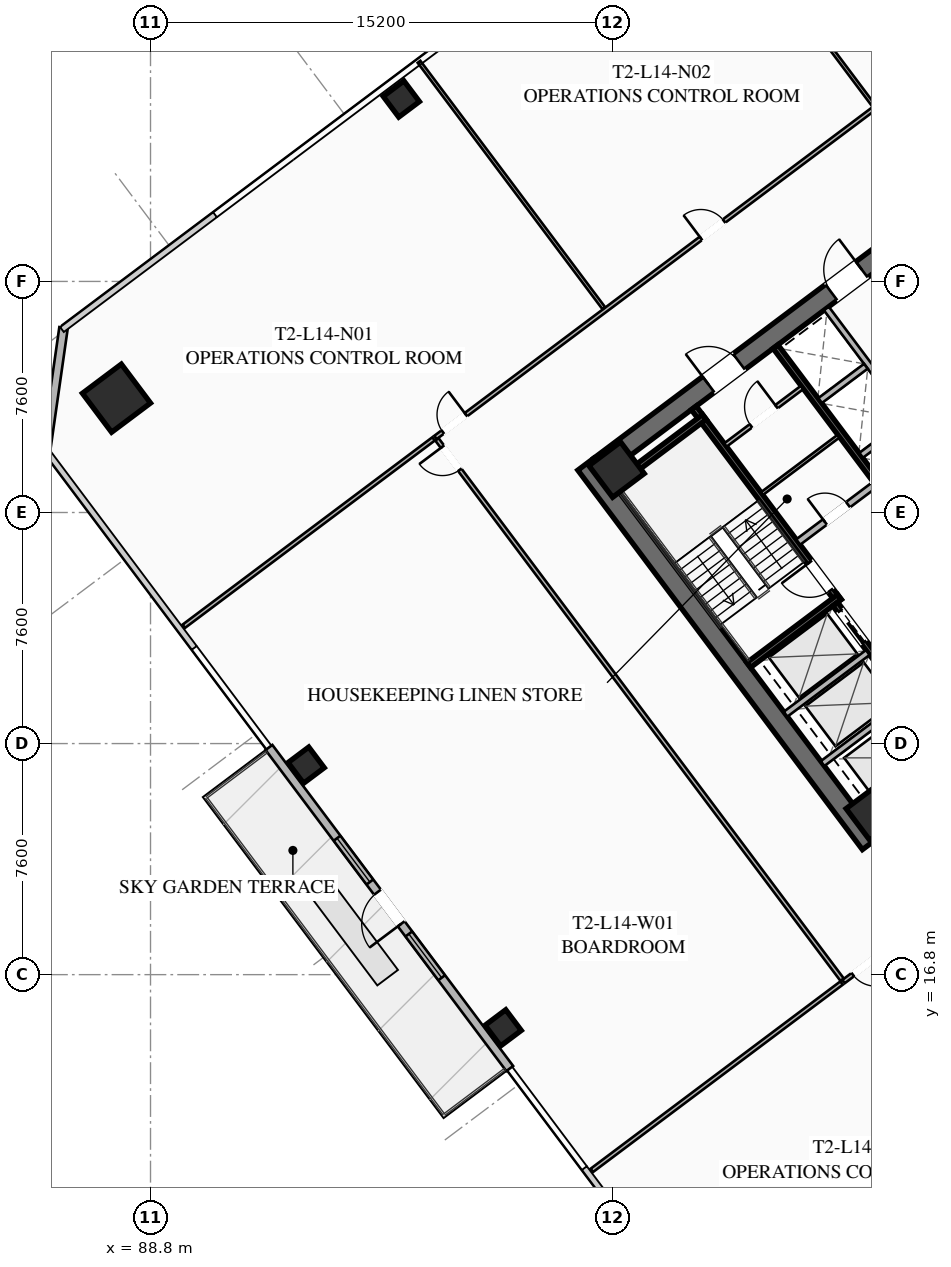
"""IFC4 building model, lengths in metres.
Left out: names, types, materials, properties, quantities, classifications, styles, units other than length and angle.
Written with IfcOpenShell. Run it as: python <this file> out.ifc"""

import sys

from ifc_helpers import new_model, si_unit, direction, frame, frame_2d, origin, origin_2d, place, context, subcontext, project, spatial, rectangle, hollow_rectangle, extrude, element, fill, save


model = new_model("IFC4")
c1 = context("Model", 3, precision=1e-05, world=origin(), true_north=direction((0.0, 1.0)))
c2 = subcontext(c1, "Body", "Model", "MODEL_VIEW")
j1 = project(units=[si_unit("LENGTHUNIT", "METRE"), si_unit("PLANEANGLEUNIT", "RADIAN")], contexts=[c1])
p1 = place(None, origin())
s1 = spatial("IfcSite", under=j1, at=p1, CompositionType="ELEMENT")
p2 = place(p1, origin())
s2 = spatial("IfcBuilding", under=s1, at=p2, CompositionType="ELEMENT")
p3 = place(p2, frame((0.0, 0.0, 56.55)))
s3 = spatial("IfcBuildingStorey", under=s2, at=p3, CompositionType="ELEMENT", Elevation=56.55)
p4 = place(p3, frame((112.476, 21.107, 0.0), z_axis=(0.0, 0.0, 1.0), x_axis=(-0.600005007985, 0.799996243986, 0.0)))
e1 = element("IfcWall", 1, at=p4, inside=s3, PredefinedType="SHEAR", context=c2, shape_type="SweptSolid", body=[
    extrude(rectangle(XDim=15.6, YDim=0.65, at=frame_2d((7.8, 0.0))), origin(), (0.0, 0.0, 1.0), 3.55),
])
p5 = place(p3, frame((124.429, 30.478, 0.0), z_axis=(0.0, 0.0, 1.0), x_axis=(-0.799998028465, -0.600002628705, 0.0)))
e2 = element("IfcWall", 2, at=p5, inside=s3, PredefinedType="SHEAR", context=c2, shape_type="SweptSolid", body=[
    extrude(rectangle(XDim=14.86, YDim=0.65, at=frame_2d((7.43, 0.0))), origin(), (0.0, 0.0, 1.0), 3.55),
])
p6 = place(p5, frame((9.13, 0.0, 0.0)))
e3 = element("IfcOpeningElement", 3, at=p6, cuts=e2, PredefinedType="OPENING", context=c2, shape_type="SweptSolid", body=[
    extrude(rectangle(XDim=1.25, YDim=2.25, at=frame_2d((0.625, 1.125))), frame((0.0, 0.335, 0.0), z_axis=(0.0, -1.0, 0.0), x_axis=(1.0, 0.0, 0.0)), (0.0, 0.0, 1.0), 0.67),
])
p7 = place(p5, frame((4.08, 0.0, 0.0)))
e4 = element("IfcOpeningElement", 4, at=p7, cuts=e2, PredefinedType="OPENING", context=c2, shape_type="SweptSolid", body=[
    extrude(rectangle(XDim=1.25, YDim=2.25, at=frame_2d((0.625, 1.125))), frame((0.0, 0.335, 0.0), z_axis=(0.0, -1.0, 0.0), x_axis=(1.0, 0.0, 0.0)), (0.0, 0.0, 1.0), 0.67),
])
p8 = place(p3, frame((103.571, 33.522, 0.0), z_axis=(0.0, 0.0, 1.0), x_axis=(0.799998028465, 0.600002628705, 0.0)))
e5 = element("IfcWall", 5, at=p8, inside=s3, PredefinedType="SHEAR", context=c2, shape_type="SweptSolid", body=[
    extrude(rectangle(XDim=14.86, YDim=0.65, at=frame_2d((7.43, 0.0))), origin(), (0.0, 0.0, 1.0), 3.55),
])
p9 = place(p8, frame((4.48, 0.0, 0.0)))
e6 = element("IfcOpeningElement", 6, at=p9, cuts=e5, PredefinedType="OPENING", context=c2, shape_type="SweptSolid", body=[
    extrude(rectangle(XDim=1.25, YDim=2.25, at=frame_2d((0.625, 1.125))), frame((0.0, 0.335, 0.0), z_axis=(0.0, -1.0, 0.0), x_axis=(1.0, 0.0, 0.0)), (0.0, 0.0, 1.0), 0.67),
])
p10 = place(p8, frame((9.53, 0.0, 0.0)))
e7 = element("IfcOpeningElement", 7, at=p10, cuts=e5, PredefinedType="OPENING", context=c2, shape_type="SweptSolid", body=[
    extrude(rectangle(XDim=1.25, YDim=2.25, at=frame_2d((0.625, 1.125))), frame((0.0, 0.335, 0.0), z_axis=(0.0, -1.0, 0.0), x_axis=(1.0, 0.0, 0.0)), (0.0, 0.0, 1.0), 0.67),
])
for number, where, z_axis, x_axis in (
    (8, (112.59, 22.13, 0.0), (0.0, 0.0, 1.0), (0.8, 0.6, 0.0)),
    (9, (104.13, 33.41, 0.0), (0.0, 0.0, 1.0), (0.8, 0.6, 0.0)),
):
    element("IfcColumn", number, at=place(p3, frame(where, z_axis=z_axis, x_axis=x_axis)), inside=s3, PredefinedType="COLUMN", context=c2, shape_type="SweptSolid", body=[
        extrude(hollow_rectangle(XDim=1.3, YDim=1.3, WallThickness=0.05, at=origin_2d()), origin(), (0.0, 0.0, 1.0), 3.35),
    ])
p11 = place(p3, frame((87.68, 35.76, 0.0), z_axis=(0.0, 0.0, 1.0), x_axis=(0.799999996291, 0.600000004945, 0.0)))
e10 = element("IfcColumn", 10, at=p11, inside=s3, PredefinedType="COLUMN", context=c2, shape_type="SweptSolid", body=[
    extrude(hollow_rectangle(XDim=1.6, YDim=1.6, WallThickness=0.06, at=origin_2d()), origin(), (0.0, 0.0, 1.0), 3.35),
])
for number, where, z_axis, x_axis in (
    (11, (97.05, 45.6, 0.0), (0.0, 0.0, 1.0), (0.8, 0.6, 0.0)),
    (12, (93.92, 23.69, 0.0), (0.0, 0.0, 1.0), (0.8, 0.6, 0.0)),
    (13, (100.4, 15.05, 0.0), (0.0, 0.0, 1.0), (0.8, 0.6, 0.0)),
):
    element("IfcColumn", number, at=place(p3, frame(where, z_axis=z_axis, x_axis=x_axis)), inside=s3, PredefinedType="COLUMN", context=c2, shape_type="SweptSolid", body=[
        extrude(hollow_rectangle(XDim=0.85, YDim=0.85, WallThickness=0.035, at=origin_2d()), origin(), (0.0, 0.0, 1.0), 3.35),
    ])
p12 = place(p3, frame((100.616, 13.712, 0.0), z_axis=(0.0, 0.0, 1.0), x_axis=(-0.599994081423, 0.800004438899, 0.0)))
e14 = element("IfcWall", 14, at=p12, inside=s3, PredefinedType="SOLIDWALL", context=c2, shape_type="SweptSolid", body=[
    extrude(rectangle(XDim=13.2, YDim=0.28, at=frame_2d((6.6, 0.0))), origin(), (0.0, 0.0, 1.0), 3.35),
])
p13 = place(p12, frame((5.95, 0.0, 0.0)))
e15 = element("IfcOpeningElement", 15, at=p13, cuts=e14, PredefinedType="OPENING", context=c2, shape_type="SweptSolid", body=[
    extrude(rectangle(XDim=1.3, YDim=2.15, at=frame_2d((0.65, 1.075))), frame((0.0, 0.15, 0.0), z_axis=(0.0, -1.0, 0.0), x_axis=(1.0, 0.0, 0.0)), (0.0, 0.0, 1.0), 0.3),
])
p14 = place(p12, frame((3.732, 0.0, 0.85)))
e16 = element("IfcOpeningElement", 16, at=p14, cuts=e14, PredefinedType="OPENING", context=c2, shape_type="SweptSolid", body=[
    extrude(rectangle(XDim=1.8, YDim=1.92, at=frame_2d((0.9, 0.96))), frame((0.0, 0.15, 0.0), z_axis=(0.0, -1.0, 0.0), x_axis=(1.0, 0.0, 0.0)), (0.0, 0.0, 1.0), 0.3),
])
p15 = place(p12, frame((7.668, 0.0, 0.85)))
e17 = element("IfcOpeningElement", 17, at=p15, cuts=e14, PredefinedType="OPENING", context=c2, shape_type="SweptSolid", body=[
    extrude(rectangle(XDim=1.8, YDim=1.92, at=frame_2d((0.9, 0.96))), frame((0.0, 0.15, 0.0), z_axis=(0.0, -1.0, 0.0), x_axis=(1.0, 0.0, 0.0)), (0.0, 0.0, 1.0), 0.3),
])
p16 = place(p3, frame((85.36, 34.02, 0.0), z_axis=(0.0, 0.0, 1.0), x_axis=(0.14137968631, 0.989955445613, 0.0)))
e18 = element("IfcWall", 18, at=p16, inside=s3, PredefinedType="SOLIDWALL", context=c2, shape_type="SweptSolid", body=[
    extrude(rectangle(XDim=4.101, YDim=0.28, at=frame_2d((2.051, 0.0))), origin(), (0.0, 0.0, 1.0), 3.35),
])
p17 = place(p3, frame((111.44, 29.08, 0.0), z_axis=(0.0, 0.0, 1.0), x_axis=(-0.600009827119, 0.799992629566, 0.0)))
e19 = element("IfcWall", 19, at=p17, inside=s3, PredefinedType="SHEAR", context=c2, shape_type="SweptSolid", body=[
    extrude(rectangle(XDim=7.95, YDim=0.2, at=frame_2d((3.975, 0.0))), origin(), (0.0, 0.0, 1.0), 3.35),
])
p18 = place(p17, frame((0.45, 0.0, 0.0)))
e20 = element("IfcOpeningElement", 20, at=p18, cuts=e19, PredefinedType="OPENING", context=c2, shape_type="SweptSolid", body=[
    extrude(rectangle(XDim=1.15, YDim=2.2, at=frame_2d((0.575, 1.1))), frame((0.0, 0.11, 0.0), z_axis=(0.0, -1.0, 0.0), x_axis=(1.0, 0.0, 0.0)), (0.0, 0.0, 1.0), 0.22),
])
for number, where, z_axis, x_axis in (
    (21, (108.476, 26.982, 0.0), (0.0, 0.0, 1.0), (0.8, 0.6, 0.0)),
    (22, (104.036, 32.902, 0.0), (0.0, 0.0, 1.0), (0.8, 0.6, 0.0)),
):
    element("IfcWall", number, at=place(p3, frame(where, z_axis=z_axis, x_axis=x_axis)), inside=s3, PredefinedType="SHEAR", context=c2, shape_type="SweptSolid", body=[
        extrude(rectangle(XDim=3.73, YDim=0.2, at=frame_2d((1.865, 0.0))), origin(), (0.0, 0.0, 1.0), 3.35),
    ])
p19 = place(p3, frame((117.938, 26.016, 0.0), z_axis=(0.0, 0.0, 1.0), x_axis=(-0.600005463273, 0.799995902516, 0.0)))
e23 = element("IfcWall", 23, at=p19, inside=s3, PredefinedType="SHEAR", context=c2, shape_type="SweptSolid", body=[
    extrude(rectangle(XDim=14.3, YDim=0.2, at=frame_2d((7.15, 0.0))), origin(), (0.0, 0.0, 1.0), 3.35),
])
p20 = place(p3, frame((110.104, 31.028, 0.0), z_axis=(0.0, 0.0, 1.0), x_axis=(0.800018601094, 0.59997519774, 0.0)))
e24 = element("IfcWall", 24, at=p20, inside=s3, PredefinedType="SOLIDWALL", context=c2, shape_type="SweptSolid", body=[
    extrude(rectangle(XDim=3.15, YDim=0.22, at=frame_2d((1.575, 0.0))), origin(), (0.0, 0.0, 1.0), 2.703),
])
p21 = place(p20, frame((1.1, 0.0, 0.0)))
e25 = element("IfcOpeningElement", 25, at=p21, cuts=e24, PredefinedType="OPENING", context=c2, shape_type="SweptSolid", body=[
    extrude(rectangle(XDim=0.95, YDim=2.05, at=frame_2d((0.475, 1.025))), frame((0.0, 0.12, 0.0), z_axis=(0.0, -1.0, 0.0), x_axis=(1.0, 0.0, 0.0)), (0.0, 0.0, 1.0), 0.24),
])
p22 = place(p3, frame((115.13, 23.91, 0.0), z_axis=(0.0, 0.0, 1.0), x_axis=(-0.599975393228, 0.800018454488, 0.0)))
e26 = element("IfcWall", 26, at=p22, inside=s3, PredefinedType="SHEAR", context=c2, shape_type="SweptSolid", body=[
    extrude(rectangle(XDim=6.35, YDim=0.2, at=frame_2d((3.175, 0.0))), origin(), (0.0, 0.0, 1.0), 3.35),
])
p23 = place(p22, frame((4.775, 0.0, 0.0)))
e27 = element("IfcOpeningElement", 27, at=p23, cuts=e26, PredefinedType="OPENING", context=c2, shape_type="SweptSolid", body=[
    extrude(rectangle(XDim=1.3, YDim=2.25, at=frame_2d((0.65, 1.125))), frame((0.0, 0.11, 0.0), z_axis=(0.0, -1.0, 0.0), x_axis=(1.0, 0.0, 0.0)), (0.0, 0.0, 1.0), 0.22),
])
p24 = place(p22, frame((2.775, 0.0, 0.0)))
e28 = element("IfcOpeningElement", 28, at=p24, cuts=e26, PredefinedType="OPENING", context=c2, shape_type="SweptSolid", body=[
    extrude(rectangle(XDim=1.3, YDim=2.25, at=frame_2d((0.65, 1.125))), frame((0.0, 0.11, 0.0), z_axis=(0.0, -1.0, 0.0), x_axis=(1.0, 0.0, 0.0)), (0.0, 0.0, 1.0), 0.22),
])
p25 = place(p22, frame((0.575, 0.0, 0.0)))
e29 = element("IfcOpeningElement", 29, at=p25, cuts=e26, PredefinedType="OPENING", context=c2, shape_type="SweptSolid", body=[
    extrude(rectangle(XDim=1.3, YDim=2.25, at=frame_2d((0.65, 1.125))), frame((0.0, 0.11, 0.0), z_axis=(0.0, -1.0, 0.0), x_axis=(1.0, 0.0, 0.0)), (0.0, 0.0, 1.0), 0.22),
])
for number, where, z_axis, x_axis in (
    (30, (110.906, 23.742, 0.0), (0.0, 0.0, 1.0), (0.8, 0.6, 0.0)),
    (31, (109.688, 25.366, 0.0), (0.0, 0.0, 1.0), (0.8, 0.6, 0.0)),
):
    element("IfcWall", number, at=place(p3, frame(where, z_axis=z_axis, x_axis=x_axis)), inside=s3, PredefinedType="SOLIDWALL", context=c2, shape_type="SweptSolid", body=[
        extrude(rectangle(XDim=3.38, YDim=0.2, at=frame_2d((1.69, 0.0))), origin(), (0.0, 0.0, 1.0), 3.35),
    ])
p26 = place(p3, frame((107.71, 34.22, 0.0), z_axis=(0.0, 0.0, 1.0), x_axis=(0.799981399002, 0.60002480053, 0.0)))
e32 = element("IfcWall", 32, at=p26, inside=s3, PredefinedType="PARTITIONING", context=c2, shape_type="SweptSolid", body=[
    extrude(rectangle(XDim=3.15, YDim=0.135, at=frame_2d((1.575, 0.0))), origin(), (0.0, 0.0, 1.0), 2.703),
])
p27 = place(p26, frame((1.05, 0.0, 0.0)))
e33 = element("IfcOpeningElement", 33, at=p27, cuts=e32, PredefinedType="OPENING", context=c2, shape_type="SweptSolid", body=[
    extrude(rectangle(XDim=1.05, YDim=2.2, at=frame_2d((0.525, 1.1))), frame((0.0, 0.077, 0.0), z_axis=(0.0, -1.0, 0.0), x_axis=(1.0, 0.0, 0.0)), (0.0, 0.0, 1.0), 0.155),
])
p28 = place(p3, frame((108.91, 32.62, 0.0), z_axis=(0.0, 0.0, 1.0), x_axis=(0.800018601094, 0.59997519774, 0.0)))
e34 = element("IfcWall", 34, at=p28, inside=s3, PredefinedType="PARTITIONING", context=c2, shape_type="SweptSolid", body=[
    extrude(rectangle(XDim=3.15, YDim=0.11, at=frame_2d((1.575, 0.0))), origin(), (0.0, 0.0, 1.0), 2.703),
])
p29 = place(p3, frame((115.11, 33.27, 0.0), z_axis=(0.0, 0.0, 1.0), x_axis=(-0.600011488909, 0.79999138319, 0.0)))
e35 = element("IfcWall", 35, at=p29, inside=s3, PredefinedType="SOLIDWALL", context=c2, shape_type="SweptSolid", body=[
    extrude(rectangle(XDim=6.8, YDim=0.2, at=frame_2d((3.4, 0.0))), origin(), (0.0, 0.0, 1.0), 3.35),
])
p30 = place(p3, frame((112.176, 33.882, 0.0), z_axis=(0.0, 0.0, 1.0), x_axis=(0.8, 0.6, 0.0)))
e36 = element("IfcWall", 36, at=p30, inside=s3, PredefinedType="SOLIDWALL", context=c2, shape_type="SweptSolid", body=[
    extrude(rectangle(XDim=1.88, YDim=0.2, at=frame_2d((0.94, 0.0))), origin(), (0.0, 0.0, 1.0), 3.35),
])
p31 = place(p3, frame((110.826, 35.682, 0.0), z_axis=(0.0, 0.0, 1.0), x_axis=(0.799984418148, 0.600020775241, 0.0)))
e37 = element("IfcWall", 37, at=p31, inside=s3, PredefinedType="SOLIDWALL", context=c2, shape_type="SweptSolid", body=[
    extrude(rectangle(XDim=1.88, YDim=0.2, at=frame_2d((0.94, 0.0))), origin(), (0.0, 0.0, 1.0), 3.35),
])
p32 = place(p3, frame((98.174, 34.468, 0.0), z_axis=(0.0, 0.0, 1.0), x_axis=(0.800000982127, 0.599998690494, 0.0)))
e38 = element("IfcWall", 38, at=p32, inside=s3, PredefinedType="PARTITIONING", context=c2, shape_type="SweptSolid", body=[
    extrude(rectangle(XDim=29.83, YDim=0.135, at=frame_2d((14.915, 0.0))), origin(), (0.0, 0.0, 1.0), 2.703),
])
p33 = place(p32, frame((0.3, 0.0, 0.0)))
e39 = element("IfcOpeningElement", 39, at=p33, cuts=e38, PredefinedType="OPENING", context=c2, shape_type="SweptSolid", body=[
    extrude(rectangle(XDim=0.95, YDim=2.05, at=frame_2d((0.475, 1.025))), frame((0.0, 0.077, 0.0), z_axis=(0.0, -1.0, 0.0), x_axis=(1.0, 0.0, 0.0)), (0.0, 0.0, 1.0), 0.155),
])
p34 = place(p32, frame((10.913, 0.0, 0.0)))
e40 = element("IfcOpeningElement", 40, at=p34, cuts=e38, PredefinedType="OPENING", context=c2, shape_type="SweptSolid", body=[
    extrude(rectangle(XDim=0.95, YDim=2.05, at=frame_2d((0.475, 1.025))), frame((0.0, 0.077, 0.0), z_axis=(0.0, -1.0, 0.0), x_axis=(1.0, 0.0, 0.0)), (0.0, 0.0, 1.0), 0.155),
])
p35 = place(p32, frame((28.58, 0.0, 0.0)))
e41 = element("IfcOpeningElement", 41, at=p35, cuts=e38, PredefinedType="OPENING", context=c2, shape_type="SweptSolid", body=[
    extrude(rectangle(XDim=0.95, YDim=2.05, at=frame_2d((0.475, 1.025))), frame((0.0, 0.077, 0.0), z_axis=(0.0, -1.0, 0.0), x_axis=(1.0, 0.0, 0.0)), (0.0, 0.0, 1.0), 0.155),
])
p36 = place(p3, frame((103.71, 38.72, 0.0), z_axis=(0.0, 0.0, 1.0), x_axis=(-0.599992287679, 0.800005784183, 0.0)))
e42 = element("IfcWall", 42, at=p36, inside=s3, PredefinedType="PARTITIONING", context=c2, shape_type="SweptSolid", body=[
    extrude(rectangle(XDim=10.13, YDim=0.11, at=frame_2d((5.065, 0.0))), origin(), (0.0, 0.0, 1.0), 2.703),
])
p37 = place(p3, frame((112.59, 45.38, 0.0), z_axis=(0.0, 0.0, 1.0), x_axis=(-0.600007712154, 0.799994215827, 0.0)))
e43 = element("IfcWall", 43, at=p37, inside=s3, PredefinedType="PARTITIONING", context=c2, shape_type="SweptSolid", body=[
    extrude(rectangle(XDim=10.13, YDim=0.11, at=frame_2d((5.065, 0.0))), origin(), (0.0, 0.0, 1.0), 2.703),
])
p38 = place(p3, frame((135.46, 34.47, 0.0), z_axis=(0.0, 0.0, 1.0), x_axis=(-0.800000982127, -0.599998690494, 0.0)))
e44 = element("IfcWall", 44, at=p38, inside=s3, PredefinedType="PARTITIONING", context=c2, shape_type="SweptSolid", body=[
    extrude(rectangle(XDim=29.83, YDim=0.135, at=frame_2d((14.915, 0.0))), origin(), (0.0, 0.0, 1.0), 2.703),
])
p39 = place(p38, frame((28.5, 0.0, 0.0)))
e45 = element("IfcOpeningElement", 45, at=p39, cuts=e44, PredefinedType="OPENING", context=c2, shape_type="SweptSolid", body=[
    extrude(rectangle(XDim=0.95, YDim=2.05, at=frame_2d((0.475, 1.025))), frame((0.0, 0.077, 0.0), z_axis=(0.0, -1.0, 0.0), x_axis=(1.0, 0.0, 0.0)), (0.0, 0.0, 1.0), 0.155),
])
p40 = place(p38, frame((17.938, 0.0, 0.0)))
e46 = element("IfcOpeningElement", 46, at=p40, cuts=e44, PredefinedType="OPENING", context=c2, shape_type="SweptSolid", body=[
    extrude(rectangle(XDim=0.95, YDim=2.05, at=frame_2d((0.475, 1.025))), frame((0.0, 0.077, 0.0), z_axis=(0.0, -1.0, 0.0), x_axis=(1.0, 0.0, 0.0)), (0.0, 0.0, 1.0), 0.155),
])
p41 = place(p38, frame((0.38, 0.0, 0.0)))
e47 = element("IfcOpeningElement", 47, at=p41, cuts=e44, PredefinedType="OPENING", context=c2, shape_type="SweptSolid", body=[
    extrude(rectangle(XDim=0.95, YDim=2.05, at=frame_2d((0.475, 1.025))), frame((0.0, 0.077, 0.0), z_axis=(0.0, -1.0, 0.0), x_axis=(1.0, 0.0, 0.0)), (0.0, 0.0, 1.0), 0.155),
])
p42 = place(p3, frame((111.548, 16.636, 0.0), z_axis=(0.0, 0.0, 1.0), x_axis=(-0.600003517529, 0.799997361841, 0.0)))
e48 = element("IfcWall", 48, at=p42, inside=s3, PredefinedType="PARTITIONING", context=c2, shape_type="SweptSolid", body=[
    extrude(rectangle(XDim=22.21, YDim=0.135, at=frame_2d((11.105, 0.0))), origin(), (0.0, 0.0, 1.0), 2.703),
])
p43 = place(p42, frame((20.96, 0.0, 0.0)))
e49 = element("IfcOpeningElement", 49, at=p43, cuts=e48, PredefinedType="OPENING", context=c2, shape_type="SweptSolid", body=[
    extrude(rectangle(XDim=0.95, YDim=2.05, at=frame_2d((0.475, 1.025))), frame((0.0, 0.077, 0.0), z_axis=(0.0, -1.0, 0.0), x_axis=(1.0, 0.0, 0.0)), (0.0, 0.0, 1.0), 0.155),
])
for number, where, z_axis, x_axis in (
    (50, (98.11, 34.42, 0.0), (0.0, 0.0, 1.0), (-0.8, -0.6, 0.0)),
    (51, (103.316, 10.362, 0.0), (0.0, 0.0, 1.0), (0.8, 0.6, 0.0)),
):
    element("IfcWall", number, at=place(p3, frame(where, z_axis=z_axis, x_axis=x_axis)), inside=s3, PredefinedType="PARTITIONING", context=c2, shape_type="SweptSolid", body=[
        extrude(rectangle(XDim=10.27, YDim=0.135, at=frame_2d((5.135, 0.0))), origin(), (0.0, 0.0, 1.0), 2.703),
    ])
p44 = place(p13, origin())
e52 = element("IfcDoor", 52, at=p44, inside=s3, OperationType="SINGLE_SWING_LEFT", PredefinedType="DOOR", context=c2, shape_type="SweptSolid", body=[
    extrude(rectangle(XDim=1.3, YDim=2.15, at=frame_2d((0.65, 1.075))), frame((0.0, 0.025, 0.0), z_axis=(0.0, -1.0, 0.0), x_axis=(1.0, 0.0, 0.0)), (0.0, 0.0, 1.0), 0.05),
])
fill(e15, e52)
p45 = place(p14, origin())
e53 = element("IfcWindow", 53, at=p45, inside=s3, PartitioningType="SINGLE_PANEL", PredefinedType="WINDOW", context=c2, shape_type="SweptSolid", body=[
    extrude(rectangle(XDim=1.8, YDim=1.92, at=frame_2d((0.9, 0.96))), frame((0.0, 0.03, 0.0), z_axis=(0.0, -1.0, 0.0), x_axis=(1.0, 0.0, 0.0)), (0.0, 0.0, 1.0), 0.06),
])
fill(e16, e53)
p46 = place(p15, origin())
e54 = element("IfcWindow", 54, at=p46, inside=s3, PartitioningType="SINGLE_PANEL", PredefinedType="WINDOW", context=c2, shape_type="SweptSolid", body=[
    extrude(rectangle(XDim=1.8, YDim=1.92, at=frame_2d((0.9, 0.96))), frame((0.0, 0.03, 0.0), z_axis=(0.0, -1.0, 0.0), x_axis=(1.0, 0.0, 0.0)), (0.0, 0.0, 1.0), 0.06),
])
fill(e17, e54)
p47 = place(p9, origin())
e55 = element("IfcDoor", 55, at=p47, inside=s3, OperationType="SINGLE_SWING_LEFT", PredefinedType="DOOR", context=c2, shape_type="SweptSolid", body=[
    extrude(rectangle(XDim=1.25, YDim=2.25, at=frame_2d((0.625, 1.125))), frame((0.0, 0.025, 0.0), z_axis=(0.0, -1.0, 0.0), x_axis=(1.0, 0.0, 0.0)), (0.0, 0.0, 1.0), 0.05),
])
fill(e6, e55)
p48 = place(p10, origin())
e56 = element("IfcDoor", 56, at=p48, inside=s3, OperationType="SINGLE_SWING_RIGHT", PredefinedType="DOOR", context=c2, shape_type="SweptSolid", body=[
    extrude(rectangle(XDim=1.25, YDim=2.25, at=frame_2d((0.625, 1.125))), frame((0.0, 0.025, 0.0), z_axis=(0.0, -1.0, 0.0), x_axis=(1.0, 0.0, 0.0)), (0.0, 0.0, 1.0), 0.05),
])
fill(e7, e56)
p49 = place(p18, origin())
e57 = element("IfcDoor", 57, at=p49, inside=s3, OperationType="SINGLE_SWING_RIGHT", PredefinedType="DOOR", context=c2, shape_type="SweptSolid", body=[
    extrude(rectangle(XDim=1.15, YDim=2.2, at=frame_2d((0.575, 1.1))), frame((0.0, 0.025, 0.0), z_axis=(0.0, -1.0, 0.0), x_axis=(1.0, 0.0, 0.0)), (0.0, 0.0, 1.0), 0.05),
])
fill(e20, e57)
p50 = place(p27, origin())
e58 = element("IfcDoor", 58, at=p50, inside=s3, OperationType="SINGLE_SWING_RIGHT", PredefinedType="DOOR", context=c2, shape_type="SweptSolid", body=[
    extrude(rectangle(XDim=1.05, YDim=2.2, at=frame_2d((0.525, 1.1))), frame((0.0, 0.025, 0.0), z_axis=(0.0, -1.0, 0.0), x_axis=(1.0, 0.0, 0.0)), (0.0, 0.0, 1.0), 0.05),
])
fill(e33, e58)
p51 = place(p21, origin())
e59 = element("IfcDoor", 59, at=p51, inside=s3, OperationType="SINGLE_SWING_LEFT", PredefinedType="DOOR", context=c2, shape_type="SweptSolid", body=[
    extrude(rectangle(XDim=0.95, YDim=2.05, at=frame_2d((0.475, 1.025))), frame((0.0, 0.025, 0.0), z_axis=(0.0, -1.0, 0.0), x_axis=(1.0, 0.0, 0.0)), (0.0, 0.0, 1.0), 0.05),
])
fill(e25, e59)
p52 = place(p33, origin())
e60 = element("IfcDoor", 60, at=p52, inside=s3, OperationType="SINGLE_SWING_RIGHT", PredefinedType="DOOR", context=c2, shape_type="SweptSolid", body=[
    extrude(rectangle(XDim=0.95, YDim=2.05, at=frame_2d((0.475, 1.025))), frame((0.0, 0.025, 0.0), z_axis=(0.0, -1.0, 0.0), x_axis=(1.0, 0.0, 0.0)), (0.0, 0.0, 1.0), 0.05),
])
fill(e39, e60)
p53 = place(p34, origin())
e61 = element("IfcDoor", 61, at=p53, inside=s3, OperationType="SINGLE_SWING_LEFT", PredefinedType="DOOR", context=c2, shape_type="SweptSolid", body=[
    extrude(rectangle(XDim=0.95, YDim=2.05, at=frame_2d((0.475, 1.025))), frame((0.0, 0.025, 0.0), z_axis=(0.0, -1.0, 0.0), x_axis=(1.0, 0.0, 0.0)), (0.0, 0.0, 1.0), 0.05),
])
fill(e40, e61)
p54 = place(p39, origin())
e62 = element("IfcDoor", 62, at=p54, inside=s3, OperationType="SINGLE_SWING_LEFT", PredefinedType="DOOR", context=c2, shape_type="SweptSolid", body=[
    extrude(rectangle(XDim=0.95, YDim=2.05, at=frame_2d((0.475, 1.025))), frame((0.0, 0.025, 0.0), z_axis=(0.0, -1.0, 0.0), x_axis=(1.0, 0.0, 0.0)), (0.0, 0.0, 1.0), 0.05),
])
fill(e45, e62)
p55 = place(p43, origin())
e63 = element("IfcDoor", 63, at=p55, inside=s3, OperationType="SINGLE_SWING_RIGHT", PredefinedType="DOOR", context=c2, shape_type="SweptSolid", body=[
    extrude(rectangle(XDim=0.95, YDim=2.05, at=frame_2d((0.475, 1.025))), frame((0.0, 0.025, 0.0), z_axis=(0.0, -1.0, 0.0), x_axis=(1.0, 0.0, 0.0)), (0.0, 0.0, 1.0), 0.05),
])
fill(e49, e63)
p56 = place(p23, origin())
e64 = element("IfcDoor", 64, at=p56, inside=s3, OperationType="SLIDING_TO_LEFT", PredefinedType="DOOR", context=c2, shape_type="SweptSolid", body=[
    extrude(rectangle(XDim=1.3, YDim=2.25, at=frame_2d((0.65, 1.125))), frame((0.0, 0.025, 0.0), z_axis=(0.0, -1.0, 0.0), x_axis=(1.0, 0.0, 0.0)), (0.0, 0.0, 1.0), 0.05),
])
fill(e27, e64)
save(model, sys.argv[1])
